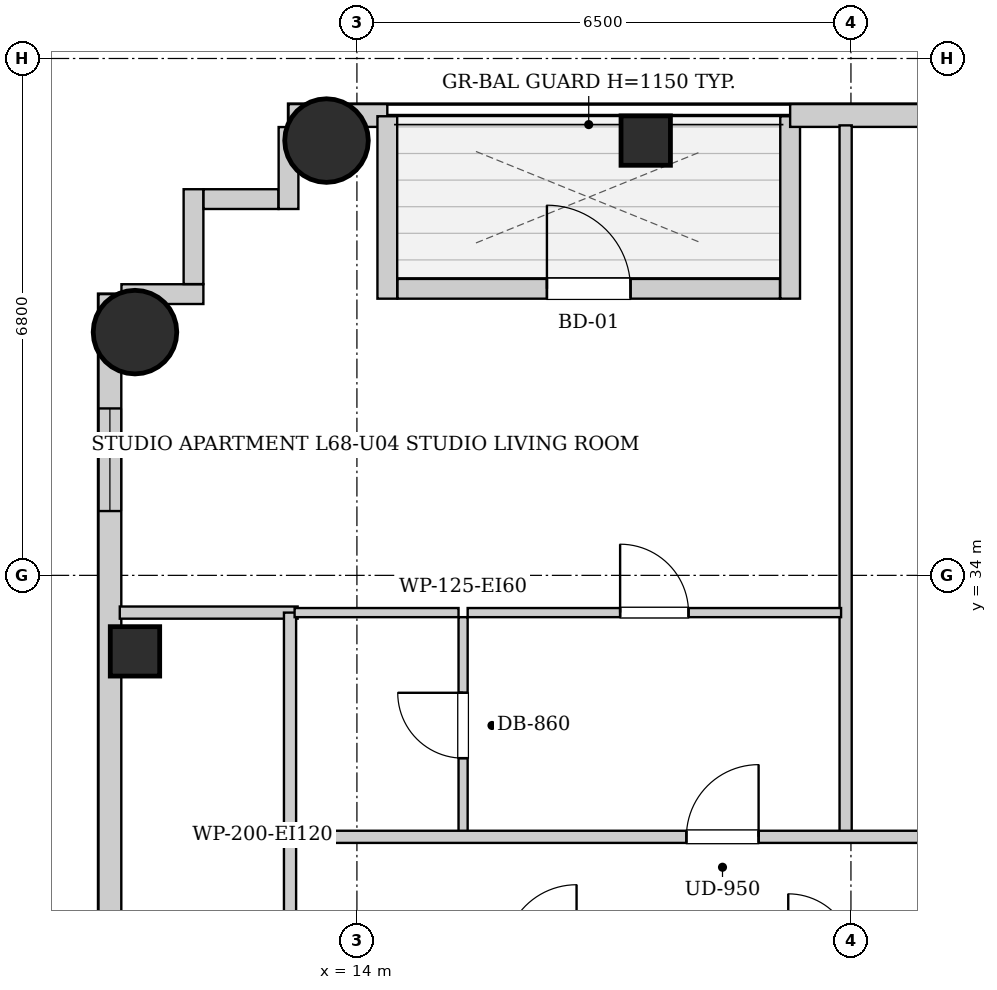
"""IFC4 building model, lengths in metres.
Left out: names, types, materials, properties, quantities, classifications, styles, units other than length and angle.
Written with IfcOpenShell. Run it as: python <this file> out.ifc"""

import sys

from ifc_helpers import new_model, si_unit, direction, frame, frame_2d, origin, origin_2d, place, context, subcontext, project, spatial, rectangle, circle, extrude, element, fill, save


model = new_model("IFC4")
c1 = context("Model", 3, precision=1e-05, world=origin(), true_north=direction((0.0, 1.0)))
c2 = subcontext(c1, "Body", "Model", "MODEL_VIEW")
j1 = project(units=[si_unit("LENGTHUNIT", "METRE"), si_unit("PLANEANGLEUNIT", "RADIAN")], contexts=[c1])
p1 = place(None, origin())
s1 = spatial("IfcSite", under=j1, at=p1, CompositionType="ELEMENT")
p2 = place(p1, origin())
s2 = spatial("IfcBuilding", under=s1, at=p2, CompositionType="ELEMENT")
p3 = place(p2, frame((0.0, 0.0, 234.3)))
s3 = spatial("IfcBuildingStorey", under=s2, at=p3, CompositionType="ELEMENT", Elevation=234.3)
p4 = place(p3, frame((13.6, 39.72, 0.0), z_axis=(0.0, 0.0, 1.0), x_axis=(1.0, 0.0, 0.0)))
e1 = element("IfcColumn", 1, at=p4, inside=s3, PredefinedType="COLUMN", context=c2, shape_type="SweptSolid", body=[
    extrude(circle(Radius=0.55, at=origin_2d()), origin(), (0.0, 0.0, 1.0), 3.4),
])
for number, where, z_axis, x_axis in (
    (2, (17.8, 39.72, 0.0), (0.0, 0.0, 1.0), (1.0, 0.0, 0.0)),
    (3, (11.08, 33.0, 0.0), (0.0, 0.0, 1.0), (1.0, 0.0, 0.0)),
):
    element("IfcColumn", number, at=place(p3, frame(where, z_axis=z_axis, x_axis=x_axis)), inside=s3, PredefinedType="COLUMN", context=c2, shape_type="SweptSolid", body=[
        extrude(rectangle(XDim=0.65, YDim=0.65, at=origin_2d()), origin(), (0.0, 0.0, 1.0), 3.4),
    ])
p5 = place(p3, frame((11.08, 37.2, 0.0), z_axis=(0.0, 0.0, 1.0), x_axis=(1.0, 0.0, 0.0)))
e4 = element("IfcColumn", 4, at=p5, inside=s3, PredefinedType="COLUMN", context=c2, shape_type="SweptSolid", body=[
    extrude(circle(Radius=0.55, at=origin_2d()), origin(), (0.0, 0.0, 1.0), 3.4),
])
p6 = place(p3, frame((13.1, 40.05, 0.0), z_axis=(0.0, 0.0, 1.0), x_axis=(1.0, 0.0, 0.0)))
e5 = element("IfcWall", 5, at=p6, inside=s3, PredefinedType="SOLIDWALL", context=c2, shape_type="SweptSolid", body=[
    extrude(rectangle(XDim=1.3, YDim=0.3, at=frame_2d((0.65, 0.0))), origin(), (0.0, 0.0, 1.0), 3.14),
])
p7 = place(p3, frame((14.4, 40.04, 0.0), z_axis=(0.0, 0.0, 1.0), x_axis=(0.0, -1.0, 0.0)))
e6 = element("IfcWall", 6, at=p7, inside=s3, PredefinedType="SOLIDWALL", context=c2, shape_type="SweptSolid", body=[
    extrude(rectangle(XDim=2.4, YDim=0.26, at=frame_2d((1.2, 0.0))), origin(), (0.0, 0.0, 1.0), 3.14),
])
p8 = place(p3, frame((14.534, 37.77, 0.0), z_axis=(0.0, 0.0, 1.0), x_axis=(1.0, 0.0, 0.0)))
e7 = element("IfcWall", 7, at=p8, inside=s3, PredefinedType="SOLIDWALL", context=c2, shape_type="SweptSolid", body=[
    extrude(rectangle(XDim=5.032, YDim=0.26, at=frame_2d((2.516, 0.0))), origin(), (0.0, 0.0, 1.0), 3.14),
])
p9 = place(p8, frame((1.966, 0.0, 0.0)))
e8 = element("IfcOpeningElement", 8, at=p9, cuts=e7, PredefinedType="OPENING", context=c2, shape_type="SweptSolid", body=[
    extrude(rectangle(XDim=1.1, YDim=2.0, at=frame_2d((0.55, 1.0))), frame((0.0, 0.14, 0.0), z_axis=(0.0, -1.0, 0.0), x_axis=(1.0, 0.0, 0.0)), (0.0, 0.0, 1.0), 0.28),
])
p10 = place(p3, frame((19.7, 37.64, 0.0), z_axis=(0.0, 0.0, 1.0), x_axis=(0.0, 1.0, 0.0)))
e9 = element("IfcWall", 9, at=p10, inside=s3, PredefinedType="SOLIDWALL", context=c2, shape_type="SweptSolid", body=[
    extrude(rectangle(XDim=2.4, YDim=0.26, at=frame_2d((1.2, 0.0))), origin(), (0.0, 0.0, 1.0), 3.14),
])
p11 = place(p3, frame((19.7, 40.05, 0.0), z_axis=(0.0, 0.0, 1.0), x_axis=(1.0, 0.0, 0.0)))
e10 = element("IfcWall", 10, at=p11, inside=s3, PredefinedType="SOLIDWALL", context=c2, shape_type="SweptSolid", body=[
    extrude(rectangle(XDim=11.0, YDim=0.3, at=frame_2d((5.5, 0.0))), origin(), (0.0, 0.0, 1.0), 3.14),
])
p12 = place(p11, frame((8.064, 0.0, 0.55)))
e11 = element("IfcOpeningElement", 11, at=p12, cuts=e10, PredefinedType="OPENING", context=c2, shape_type="SweptSolid", body=[
    extrude(rectangle(XDim=1.35, YDim=1.2, at=frame_2d((0.675, 0.6))), frame((0.0, 0.16, 0.0), z_axis=(0.0, -1.0, 0.0), x_axis=(1.0, 0.0, 0.0)), (0.0, 0.0, 1.0), 0.32),
])
p13 = place(p3, frame((10.75, 6.3, 0.0), z_axis=(0.0, 0.0, 1.0), x_axis=(0.0, 1.0, 0.0)))
e12 = element("IfcWall", 12, at=p13, inside=s3, PredefinedType="SOLIDWALL", context=c2, shape_type="SweptSolid", body=[
    extrude(rectangle(XDim=31.4, YDim=0.3, at=frame_2d((15.7, 0.0))), origin(), (0.0, 0.0, 1.0), 3.14),
])
p14 = place(p13, frame((28.546, 0.0, 0.55)))
e13 = element("IfcOpeningElement", 13, at=p14, cuts=e12, PredefinedType="OPENING", context=c2, shape_type="SweptSolid", body=[
    extrude(rectangle(XDim=1.35, YDim=1.2, at=frame_2d((0.675, 0.6))), frame((0.0, 0.16, 0.0), z_axis=(0.0, -1.0, 0.0), x_axis=(1.0, 0.0, 0.0)), (0.0, 0.0, 1.0), 0.32),
])
p15 = place(p13, frame((11.85, 0.0, 0.55)))
e14 = element("IfcOpeningElement", 14, at=p15, cuts=e12, PredefinedType="OPENING", context=c2, shape_type="SweptSolid", body=[
    extrude(rectangle(XDim=1.35, YDim=1.2, at=frame_2d((0.675, 0.6))), frame((0.0, 0.16, 0.0), z_axis=(0.0, -1.0, 0.0), x_axis=(1.0, 0.0, 0.0)), (0.0, 0.0, 1.0), 0.32),
])
p16 = place(p13, frame((9.185, 0.0, 0.55)))
e15 = element("IfcOpeningElement", 15, at=p16, cuts=e12, PredefinedType="OPENING", context=c2, shape_type="SweptSolid", body=[
    extrude(rectangle(XDim=1.35, YDim=1.2, at=frame_2d((0.675, 0.6))), frame((0.0, 0.16, 0.0), z_axis=(0.0, -1.0, 0.0), x_axis=(1.0, 0.0, 0.0)), (0.0, 0.0, 1.0), 0.32),
])
p17 = place(p13, frame((19.006, 0.0, 0.55)))
e16 = element("IfcOpeningElement", 16, at=p17, cuts=e12, PredefinedType="OPENING", context=c2, shape_type="SweptSolid", body=[
    extrude(rectangle(XDim=1.35, YDim=1.2, at=frame_2d((0.675, 0.6))), frame((0.0, 0.16, 0.0), z_axis=(0.0, -1.0, 0.0), x_axis=(1.0, 0.0, 0.0)), (0.0, 0.0, 1.0), 0.32),
])
p18 = place(p13, frame((20.616, 0.0, 0.55)))
e17 = element("IfcOpeningElement", 17, at=p18, cuts=e12, PredefinedType="OPENING", context=c2, shape_type="SweptSolid", body=[
    extrude(rectangle(XDim=1.35, YDim=1.2, at=frame_2d((0.675, 0.6))), frame((0.0, 0.16, 0.0), z_axis=(0.0, -1.0, 0.0), x_axis=(1.0, 0.0, 0.0)), (0.0, 0.0, 1.0), 0.32),
])
p19 = place(p3, frame((10.902, 37.7, 0.0), z_axis=(0.0, 0.0, 1.0), x_axis=(1.0, 0.0, 0.0)))
e18 = element("IfcWall", 18, at=p19, inside=s3, PredefinedType="SOLIDWALL", context=c2, shape_type="SweptSolid", body=[
    extrude(rectangle(XDim=1.078, YDim=0.26, at=frame_2d((0.539, 0.0))), origin(), (0.0, 0.0, 1.0), 3.14),
])
p20 = place(p3, frame((11.85, 37.832, 0.0), z_axis=(0.0, 0.0, 1.0), x_axis=(0.0, 1.0, 0.0)))
e19 = element("IfcWall", 19, at=p20, inside=s3, PredefinedType="SOLIDWALL", context=c2, shape_type="SweptSolid", body=[
    extrude(rectangle(XDim=1.248, YDim=0.26, at=frame_2d((0.624, 0.0))), origin(), (0.0, 0.0, 1.0), 3.14),
])
p21 = place(p3, frame((11.982, 38.95, 0.0), z_axis=(0.0, 0.0, 1.0), x_axis=(1.0, 0.0, 0.0)))
e20 = element("IfcWall", 20, at=p21, inside=s3, PredefinedType="SOLIDWALL", context=c2, shape_type="SweptSolid", body=[
    extrude(rectangle(XDim=0.986, YDim=0.26, at=frame_2d((0.493, 0.0))), origin(), (0.0, 0.0, 1.0), 3.14),
])
p22 = place(p3, frame((13.1, 38.82, 0.0), z_axis=(0.0, 0.0, 1.0), x_axis=(0.0, 1.0, 0.0)))
e21 = element("IfcWall", 21, at=p22, inside=s3, PredefinedType="SOLIDWALL", context=c2, shape_type="SweptSolid", body=[
    extrude(rectangle(XDim=1.078, YDim=0.26, at=frame_2d((0.539, 0.0))), origin(), (0.0, 0.0, 1.0), 3.14),
])
p23 = place(p3, frame((13.12, 28.98, 0.0), z_axis=(0.0, 0.0, 1.0), x_axis=(0.0, 1.0, 0.0)))
e22 = element("IfcWall", 22, at=p23, inside=s3, PredefinedType="PARTITIONING", context=c2, shape_type="SweptSolid", body=[
    extrude(rectangle(XDim=1.58, YDim=0.16, at=frame_2d((0.79, 0.0))), origin(), (0.0, 0.0, 1.0), 3.14),
])
p24 = place(p3, frame((10.88, 33.51, 0.0), z_axis=(0.0, 0.0, 1.0), x_axis=(1.0, 0.0, 0.0)))
e23 = element("IfcWall", 23, at=p24, inside=s3, PredefinedType="PARTITIONING", context=c2, shape_type="SweptSolid", body=[
    extrude(rectangle(XDim=2.34, YDim=0.16, at=frame_2d((1.17, 0.0))), origin(), (0.0, 0.0, 1.0), 3.14),
])
p25 = place(p3, frame((13.12, 30.6, 0.0), z_axis=(0.0, 0.0, 1.0), x_axis=(0.0, 1.0, 0.0)))
e24 = element("IfcWall", 24, at=p25, inside=s3, PredefinedType="PARTITIONING", context=c2, shape_type="SweptSolid", body=[
    extrude(rectangle(XDim=2.91, YDim=0.16, at=frame_2d((1.455, 0.0))), origin(), (0.0, 0.0, 1.0), 3.14),
])
p26 = place(p3, frame((20.43, 30.6, 0.0), z_axis=(0.0, 0.0, 1.0), x_axis=(0.0, 1.0, 0.0)))
e25 = element("IfcWall", 25, at=p26, inside=s3, PredefinedType="PARTITIONING", context=c2, shape_type="SweptSolid", body=[
    extrude(rectangle(XDim=9.32, YDim=0.16, at=frame_2d((4.66, 0.0))), origin(), (0.0, 0.0, 1.0), 3.14),
])
p27 = place(p3, frame((15.397, 30.6, 0.0), z_axis=(0.0, 0.0, 1.0), x_axis=(0.0, 1.0, 0.0)))
e26 = element("IfcWall", 26, at=p27, inside=s3, PredefinedType="PARTITIONING", context=c2, shape_type="SweptSolid", body=[
    extrude(rectangle(XDim=2.85, YDim=0.12, at=frame_2d((1.425, 0.0))), origin(), (0.0, 0.0, 1.0), 3.14),
])
p28 = place(p27, frame((0.995, 0.0, 0.0)))
e27 = element("IfcOpeningElement", 27, at=p28, cuts=e26, PredefinedType="OPENING", context=c2, shape_type="SweptSolid", body=[
    extrude(rectangle(XDim=0.86, YDim=2.05, at=frame_2d((0.43, 1.025))), frame((0.0, 0.07, 0.0), z_axis=(0.0, -1.0, 0.0), x_axis=(1.0, 0.0, 0.0)), (0.0, 0.0, 1.0), 0.14),
])
p29 = place(p3, frame((13.18, 33.51, 0.0), z_axis=(0.0, 0.0, 1.0), x_axis=(1.0, 0.0, 0.0)))
e28 = element("IfcWall", 28, at=p29, inside=s3, PredefinedType="PARTITIONING", context=c2, shape_type="SweptSolid", body=[
    extrude(rectangle(XDim=2.157, YDim=0.12, at=frame_2d((1.079, 0.0))), origin(), (0.0, 0.0, 1.0), 3.14),
])
p30 = place(p3, frame((15.457, 33.51, 0.0), z_axis=(0.0, 0.0, 1.0), x_axis=(1.0, 0.0, 0.0)))
e29 = element("IfcWall", 29, at=p30, inside=s3, PredefinedType="PARTITIONING", context=c2, shape_type="SweptSolid", body=[
    extrude(rectangle(XDim=4.913, YDim=0.12, at=frame_2d((2.457, 0.0))), origin(), (0.0, 0.0, 1.0), 3.14),
])
p31 = place(p30, frame((2.006, 0.0, 0.0)))
e30 = element("IfcOpeningElement", 30, at=p31, cuts=e29, PredefinedType="OPENING", context=c2, shape_type="SweptSolid", body=[
    extrude(rectangle(XDim=0.9, YDim=2.05, at=frame_2d((0.45, 1.025))), frame((0.0, 0.07, 0.0), z_axis=(0.0, -1.0, 0.0), x_axis=(1.0, 0.0, 0.0)), (0.0, 0.0, 1.0), 0.14),
])
p32 = place(p3, frame((13.15, 30.56, 0.0), z_axis=(0.0, 0.0, 1.0), x_axis=(1.0, 0.0, 0.0)))
e31 = element("IfcWall", 31, at=p32, inside=s3, PredefinedType="PARTITIONING", context=c2, shape_type="SweptSolid", body=[
    extrude(rectangle(XDim=24.6, YDim=0.16, at=frame_2d((12.3, 0.0))), origin(), (0.0, 0.0, 1.0), 3.14),
])
p33 = place(p32, frame((5.185, 0.0, 0.0)))
e32 = element("IfcOpeningElement", 32, at=p33, cuts=e31, PredefinedType="OPENING", context=c2, shape_type="SweptSolid", body=[
    extrude(rectangle(XDim=0.95, YDim=2.1, at=frame_2d((0.475, 1.05))), frame((0.0, 0.09, 0.0), z_axis=(0.0, -1.0, 0.0), x_axis=(1.0, 0.0, 0.0)), (0.0, 0.0, 1.0), 0.18),
])
p34 = place(p32, frame((14.16, 0.0, 0.0)))
e33 = element("IfcOpeningElement", 33, at=p34, cuts=e31, PredefinedType="OPENING", context=c2, shape_type="SweptSolid", body=[
    extrude(rectangle(XDim=0.95, YDim=2.1, at=frame_2d((0.475, 1.05))), frame((0.0, 0.09, 0.0), z_axis=(0.0, -1.0, 0.0), x_axis=(1.0, 0.0, 0.0)), (0.0, 0.0, 1.0), 0.18),
])
p35 = place(p32, frame((22.825, 0.0, 0.0)))
e34 = element("IfcOpeningElement", 34, at=p35, cuts=e31, PredefinedType="OPENING", context=c2, shape_type="SweptSolid", body=[
    extrude(rectangle(XDim=0.95, YDim=2.1, at=frame_2d((0.475, 1.05))), frame((0.0, 0.09, 0.0), z_axis=(0.0, -1.0, 0.0), x_axis=(1.0, 0.0, 0.0)), (0.0, 0.0, 1.0), 0.18),
])
p36 = place(p28, origin())
e35 = element("IfcDoor", 35, at=p36, inside=s3, OperationType="SINGLE_SWING_RIGHT", PredefinedType="DOOR", context=c2, shape_type="SweptSolid", body=[
    extrude(rectangle(XDim=0.86, YDim=2.05, at=frame_2d((0.43, 1.025))), frame((0.0, 0.025, 0.0), z_axis=(0.0, -1.0, 0.0), x_axis=(1.0, 0.0, 0.0)), (0.0, 0.0, 1.0), 0.05),
])
fill(e27, e35)
p37 = place(p31, origin())
e36 = element("IfcDoor", 36, at=p37, inside=s3, OperationType="SINGLE_SWING_LEFT", PredefinedType="DOOR", context=c2, shape_type="SweptSolid", body=[
    extrude(rectangle(XDim=0.9, YDim=2.05, at=frame_2d((0.45, 1.025))), frame((0.0, 0.025, 0.0), z_axis=(0.0, -1.0, 0.0), x_axis=(1.0, 0.0, 0.0)), (0.0, 0.0, 1.0), 0.05),
])
fill(e30, e36)
p38 = place(p33, origin())
e37 = element("IfcDoor", 37, at=p38, inside=s3, OperationType="SINGLE_SWING_RIGHT", PredefinedType="DOOR", context=c2, shape_type="SweptSolid", body=[
    extrude(rectangle(XDim=0.95, YDim=2.1, at=frame_2d((0.475, 1.05))), frame((0.0, 0.025, 0.0), z_axis=(0.0, -1.0, 0.0), x_axis=(1.0, 0.0, 0.0)), (0.0, 0.0, 1.0), 0.05),
])
fill(e32, e37)
p39 = place(p9, origin())
e38 = element("IfcDoor", 38, at=p39, inside=s3, OperationType="SINGLE_SWING_LEFT", PredefinedType="DOOR", context=c2, shape_type="SweptSolid", body=[
    extrude(rectangle(XDim=1.1, YDim=2.0, at=frame_2d((0.55, 1.0))), frame((0.0, 0.025, 0.0), z_axis=(0.0, -1.0, 0.0), x_axis=(1.0, 0.0, 0.0)), (0.0, 0.0, 1.0), 0.05),
])
fill(e8, e38)
p40 = place(p14, origin())
e39 = element("IfcWindow", 39, at=p40, inside=s3, PartitioningType="SINGLE_PANEL", PredefinedType="WINDOW", context=c2, shape_type="SweptSolid", body=[
    extrude(rectangle(XDim=1.35, YDim=1.2, at=frame_2d((0.675, 0.6))), frame((0.0, 0.03, 0.0), z_axis=(0.0, -1.0, 0.0), x_axis=(1.0, 0.0, 0.0)), (0.0, 0.0, 1.0), 0.06),
])
fill(e13, e39)
save(model, sys.argv[1])
